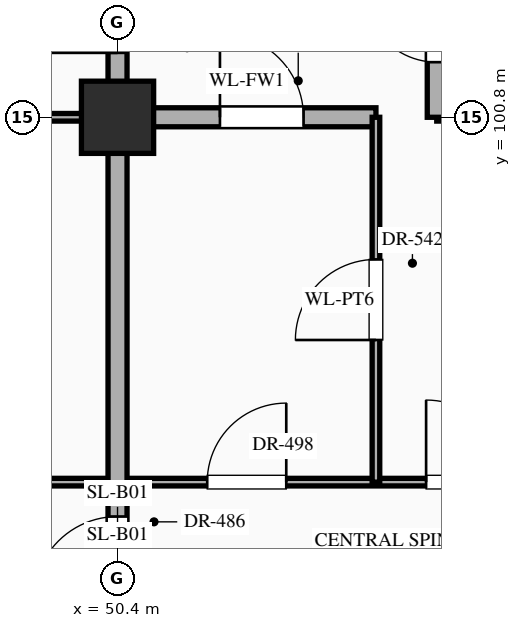
"""IFC4 building model, lengths in metres.
Left out: names, types, materials, properties, quantities, classifications, styles, units other than length and angle.
Written with IfcOpenShell. Run it as: python <this file> out.ifc"""

import sys

from ifc_helpers import new_model, si_unit, direction, frame, frame_2d, origin, origin_2d, place, context, subcontext, project, spatial, rectangle, extrude, element, fill, save


model = new_model("IFC4")
c1 = context("Model", 3, precision=1e-05, world=origin(), true_north=direction((0.0, 1.0)))
c2 = subcontext(c1, "Body", "Model", "MODEL_VIEW")
j1 = project(units=[si_unit("LENGTHUNIT", "METRE"), si_unit("PLANEANGLEUNIT", "RADIAN")], contexts=[c1])
p1 = place(None, origin())
s1 = spatial("IfcSite", under=j1, at=p1, CompositionType="ELEMENT")
p2 = place(p1, origin())
s2 = spatial("IfcBuilding", under=s1, at=p2, CompositionType="ELEMENT")
p3 = place(p2, frame((0.0, 0.0, -5.4)))
s3 = spatial("IfcBuildingStorey", under=s2, at=p3, CompositionType="ELEMENT", Elevation=-5.4)
p4 = place(p3, frame((50.4, 100.8, 0.0), z_axis=(0.0, 0.0, 1.0), x_axis=(1.0, 0.0, 0.0)))
e1 = element("IfcColumn", 1, at=p4, inside=s3, PredefinedType="COLUMN", context=c2, shape_type="SweptSolid", body=[
    extrude(rectangle(XDim=0.95, YDim=0.95, at=origin_2d()), origin(), (0.0, 0.0, 1.0), 5.4),
])
p5 = place(p3, frame((16.8, 96.0, 0.0), z_axis=(0.0, 0.0, 1.0), x_axis=(1.0, 0.0, 0.0)))
e2 = element("IfcWall", 2, at=p5, inside=s3, PredefinedType="STANDARD", context=c2, shape_type="SweptSolid", body=[
    extrude(rectangle(XDim=134.4, YDim=0.1, at=frame_2d((67.2, 0.0))), origin(), (0.0, 0.0, 1.0), 5.1),
])
p6 = place(p5, frame((3.56, 0.0, 0.0)))
e3 = element("IfcOpeningElement", 3, at=p6, cuts=e2, PredefinedType="OPENING", context=c2, shape_type="SweptSolid", body=[
    extrude(rectangle(XDim=1.28, YDim=2.35, at=frame_2d((0.64, 1.175))), frame((0.0, 0.062, 0.0), z_axis=(0.0, -1.0, 0.0), x_axis=(1.0, 0.0, 0.0)), (0.0, 0.0, 1.0), 0.124),
])
p7 = place(p5, frame((9.63, 0.0, 0.0)))
e4 = element("IfcOpeningElement", 4, at=p7, cuts=e2, PredefinedType="OPENING", context=c2, shape_type="SweptSolid", body=[
    extrude(rectangle(XDim=0.94, YDim=2.3, at=frame_2d((0.47, 1.15))), frame((0.0, 0.062, 0.0), z_axis=(0.0, -1.0, 0.0), x_axis=(1.0, 0.0, 0.0)), (0.0, 0.0, 1.0), 0.124),
])
p8 = place(p5, frame((12.51, 0.0, 0.0)))
e5 = element("IfcOpeningElement", 5, at=p8, cuts=e2, PredefinedType="OPENING", context=c2, shape_type="SweptSolid", body=[
    extrude(rectangle(XDim=0.98, YDim=2.35, at=frame_2d((0.49, 1.175))), frame((0.0, 0.062, 0.0), z_axis=(0.0, -1.0, 0.0), x_axis=(1.0, 0.0, 0.0)), (0.0, 0.0, 1.0), 0.124),
])
p9 = place(p5, frame((14.99, 0.0, 0.0)))
e6 = element("IfcOpeningElement", 6, at=p9, cuts=e2, PredefinedType="OPENING", context=c2, shape_type="SweptSolid", body=[
    extrude(rectangle(XDim=1.02, YDim=2.4, at=frame_2d((0.51, 1.2))), frame((0.0, 0.062, 0.0), z_axis=(0.0, -1.0, 0.0), x_axis=(1.0, 0.0, 0.0)), (0.0, 0.0, 1.0), 0.124),
])
p10 = place(p5, frame((20.47, 0.0, 0.0)))
e7 = element("IfcOpeningElement", 7, at=p10, cuts=e2, PredefinedType="OPENING", context=c2, shape_type="SweptSolid", body=[
    extrude(rectangle(XDim=1.06, YDim=2.4, at=frame_2d((0.53, 1.2))), frame((0.0, 0.062, 0.0), z_axis=(0.0, -1.0, 0.0), x_axis=(1.0, 0.0, 0.0)), (0.0, 0.0, 1.0), 0.124),
])
p11 = place(p5, frame((28.83, 0.0, 0.0)))
e8 = element("IfcOpeningElement", 8, at=p11, cuts=e2, PredefinedType="OPENING", context=c2, shape_type="SweptSolid", body=[
    extrude(rectangle(XDim=1.14, YDim=2.4, at=frame_2d((0.57, 1.2))), frame((0.0, 0.062, 0.0), z_axis=(0.0, -1.0, 0.0), x_axis=(1.0, 0.0, 0.0)), (0.0, 0.0, 1.0), 0.124),
])
p12 = place(p5, frame((34.78, 0.0, 0.0)))
e9 = element("IfcOpeningElement", 9, at=p12, cuts=e2, PredefinedType="OPENING", context=c2, shape_type="SweptSolid", body=[
    extrude(rectangle(XDim=1.04, YDim=2.2, at=frame_2d((0.52, 1.1))), frame((0.0, 0.062, 0.0), z_axis=(0.0, -1.0, 0.0), x_axis=(1.0, 0.0, 0.0)), (0.0, 0.0, 1.0), 0.124),
])
p13 = place(p5, frame((37.66, 0.0, 0.0)))
e10 = element("IfcOpeningElement", 10, at=p13, cuts=e2, PredefinedType="OPENING", context=c2, shape_type="SweptSolid", body=[
    extrude(rectangle(XDim=1.08, YDim=2.25, at=frame_2d((0.54, 1.125))), frame((0.0, 0.062, 0.0), z_axis=(0.0, -1.0, 0.0), x_axis=(1.0, 0.0, 0.0)), (0.0, 0.0, 1.0), 0.124),
])
p14 = place(p5, frame((40.14, 0.0, 0.0)))
e11 = element("IfcOpeningElement", 11, at=p14, cuts=e2, PredefinedType="OPENING", context=c2, shape_type="SweptSolid", body=[
    extrude(rectangle(XDim=1.12, YDim=2.25, at=frame_2d((0.56, 1.125))), frame((0.0, 0.062, 0.0), z_axis=(0.0, -1.0, 0.0), x_axis=(1.0, 0.0, 0.0)), (0.0, 0.0, 1.0), 0.124),
])
p15 = place(p5, frame((45.62, 0.0, 0.0)))
e12 = element("IfcOpeningElement", 12, at=p15, cuts=e2, PredefinedType="OPENING", context=c2, shape_type="SweptSolid", body=[
    extrude(rectangle(XDim=1.16, YDim=2.3, at=frame_2d((0.58, 1.15))), frame((0.0, 0.062, 0.0), z_axis=(0.0, -1.0, 0.0), x_axis=(1.0, 0.0, 0.0)), (0.0, 0.0, 1.0), 0.124),
])
p16 = place(p5, frame((54.0, 0.0, 0.0)))
e13 = element("IfcOpeningElement", 13, at=p16, cuts=e2, PredefinedType="OPENING", context=c2, shape_type="SweptSolid", body=[
    extrude(rectangle(XDim=1.2, YDim=2.35, at=frame_2d((0.6, 1.175))), frame((0.0, 0.062, 0.0), z_axis=(0.0, -1.0, 0.0), x_axis=(1.0, 0.0, 0.0)), (0.0, 0.0, 1.0), 0.124),
])
p17 = place(p5, frame((62.38, 0.0, 0.0)))
e14 = element("IfcOpeningElement", 14, at=p17, cuts=e2, PredefinedType="OPENING", context=c2, shape_type="SweptSolid", body=[
    extrude(rectangle(XDim=1.24, YDim=2.3, at=frame_2d((0.62, 1.15))), frame((0.0, 0.062, 0.0), z_axis=(0.0, -1.0, 0.0), x_axis=(1.0, 0.0, 0.0)), (0.0, 0.0, 1.0), 0.124),
])
p18 = place(p5, frame((68.37, 0.0, 0.0)))
e15 = element("IfcOpeningElement", 15, at=p18, cuts=e2, PredefinedType="OPENING", context=c2, shape_type="SweptSolid", body=[
    extrude(rectangle(XDim=1.06, YDim=2.4, at=frame_2d((0.53, 1.2))), frame((0.0, 0.062, 0.0), z_axis=(0.0, -1.0, 0.0), x_axis=(1.0, 0.0, 0.0)), (0.0, 0.0, 1.0), 0.124),
])
p19 = place(p5, frame((71.23, 0.0, 0.0)))
e16 = element("IfcOpeningElement", 16, at=p19, cuts=e2, PredefinedType="OPENING", context=c2, shape_type="SweptSolid", body=[
    extrude(rectangle(XDim=1.14, YDim=2.4, at=frame_2d((0.57, 1.2))), frame((0.0, 0.062, 0.0), z_axis=(0.0, -1.0, 0.0), x_axis=(1.0, 0.0, 0.0)), (0.0, 0.0, 1.0), 0.124),
])
p20 = place(p5, frame((73.85, 0.0, 0.0)))
e17 = element("IfcOpeningElement", 17, at=p20, cuts=e2, PredefinedType="OPENING", context=c2, shape_type="SweptSolid", body=[
    extrude(rectangle(XDim=0.9, YDim=2.15, at=frame_2d((0.45, 1.075))), frame((0.0, 0.062, 0.0), z_axis=(0.0, -1.0, 0.0), x_axis=(1.0, 0.0, 0.0)), (0.0, 0.0, 1.0), 0.124),
])
p21 = place(p5, frame((79.37, 0.0, 0.0)))
e18 = element("IfcOpeningElement", 18, at=p21, cuts=e2, PredefinedType="OPENING", context=c2, shape_type="SweptSolid", body=[
    extrude(rectangle(XDim=0.86, YDim=2.1, at=frame_2d((0.43, 1.05))), frame((0.0, 0.062, 0.0), z_axis=(0.0, -1.0, 0.0), x_axis=(1.0, 0.0, 0.0)), (0.0, 0.0, 1.0), 0.124),
])
p22 = place(p5, frame((87.74, 0.0, 0.0)))
e19 = element("IfcOpeningElement", 19, at=p22, cuts=e2, PredefinedType="OPENING", context=c2, shape_type="SweptSolid", body=[
    extrude(rectangle(XDim=0.92, YDim=2.15, at=frame_2d((0.46, 1.075))), frame((0.0, 0.062, 0.0), z_axis=(0.0, -1.0, 0.0), x_axis=(1.0, 0.0, 0.0)), (0.0, 0.0, 1.0), 0.124),
])
p23 = place(p5, frame((93.62, 0.0, 0.0)))
e20 = element("IfcOpeningElement", 20, at=p23, cuts=e2, PredefinedType="OPENING", context=c2, shape_type="SweptSolid", body=[
    extrude(rectangle(XDim=0.96, YDim=2.2, at=frame_2d((0.48, 1.1))), frame((0.0, 0.062, 0.0), z_axis=(0.0, -1.0, 0.0), x_axis=(1.0, 0.0, 0.0)), (0.0, 0.0, 1.0), 0.124),
])
p24 = place(p5, frame((96.5, 0.0, 0.0)))
e21 = element("IfcOpeningElement", 21, at=p24, cuts=e2, PredefinedType="OPENING", context=c2, shape_type="SweptSolid", body=[
    extrude(rectangle(XDim=1.0, YDim=2.25, at=frame_2d((0.5, 1.125))), frame((0.0, 0.062, 0.0), z_axis=(0.0, -1.0, 0.0), x_axis=(1.0, 0.0, 0.0)), (0.0, 0.0, 1.0), 0.124),
])
p25 = place(p5, frame((98.98, 0.0, 0.0)))
e22 = element("IfcOpeningElement", 22, at=p25, cuts=e2, PredefinedType="OPENING", context=c2, shape_type="SweptSolid", body=[
    extrude(rectangle(XDim=1.04, YDim=2.2, at=frame_2d((0.52, 1.1))), frame((0.0, 0.062, 0.0), z_axis=(0.0, -1.0, 0.0), x_axis=(1.0, 0.0, 0.0)), (0.0, 0.0, 1.0), 0.124),
])
p26 = place(p5, frame((104.53, 0.0, 0.0)))
e23 = element("IfcOpeningElement", 23, at=p26, cuts=e2, PredefinedType="OPENING", context=c2, shape_type="SweptSolid", body=[
    extrude(rectangle(XDim=0.94, YDim=2.3, at=frame_2d((0.47, 1.15))), frame((0.0, 0.062, 0.0), z_axis=(0.0, -1.0, 0.0), x_axis=(1.0, 0.0, 0.0)), (0.0, 0.0, 1.0), 0.124),
])
p27 = place(p5, frame((112.91, 0.0, 0.0)))
e24 = element("IfcOpeningElement", 24, at=p27, cuts=e2, PredefinedType="OPENING", context=c2, shape_type="SweptSolid", body=[
    extrude(rectangle(XDim=0.98, YDim=2.35, at=frame_2d((0.49, 1.175))), frame((0.0, 0.062, 0.0), z_axis=(0.0, -1.0, 0.0), x_axis=(1.0, 0.0, 0.0)), (0.0, 0.0, 1.0), 0.124),
])
p28 = place(p5, frame((118.79, 0.0, 0.0)))
e25 = element("IfcOpeningElement", 25, at=p28, cuts=e2, PredefinedType="OPENING", context=c2, shape_type="SweptSolid", body=[
    extrude(rectangle(XDim=1.02, YDim=2.4, at=frame_2d((0.51, 1.2))), frame((0.0, 0.062, 0.0), z_axis=(0.0, -1.0, 0.0), x_axis=(1.0, 0.0, 0.0)), (0.0, 0.0, 1.0), 0.124),
])
p29 = place(p5, frame((121.67, 0.0, 0.0)))
e26 = element("IfcOpeningElement", 26, at=p29, cuts=e2, PredefinedType="OPENING", context=c2, shape_type="SweptSolid", body=[
    extrude(rectangle(XDim=1.06, YDim=2.4, at=frame_2d((0.53, 1.2))), frame((0.0, 0.062, 0.0), z_axis=(0.0, -1.0, 0.0), x_axis=(1.0, 0.0, 0.0)), (0.0, 0.0, 1.0), 0.124),
])
p30 = place(p5, frame((124.13, 0.0, 0.0)))
e27 = element("IfcOpeningElement", 27, at=p30, cuts=e2, PredefinedType="OPENING", context=c2, shape_type="SweptSolid", body=[
    extrude(rectangle(XDim=1.14, YDim=2.4, at=frame_2d((0.57, 1.2))), frame((0.0, 0.062, 0.0), z_axis=(0.0, -1.0, 0.0), x_axis=(1.0, 0.0, 0.0)), (0.0, 0.0, 1.0), 0.124),
])
p31 = place(p5, frame((129.75, 0.0, 0.0)))
e28 = element("IfcOpeningElement", 28, at=p31, cuts=e2, PredefinedType="OPENING", context=c2, shape_type="SweptSolid", body=[
    extrude(rectangle(XDim=0.9, YDim=2.15, at=frame_2d((0.45, 1.075))), frame((0.0, 0.062, 0.0), z_axis=(0.0, -1.0, 0.0), x_axis=(1.0, 0.0, 0.0)), (0.0, 0.0, 1.0), 0.124),
])
p32 = place(p3, frame((46.2, 100.8, 0.0), z_axis=(0.0, 0.0, 1.0), x_axis=(1.0, 0.0, 0.0)))
e29 = element("IfcWall", 29, at=p32, inside=s3, PredefinedType="STANDARD", context=c2, shape_type="SweptSolid", body=[
    extrude(rectangle(XDim=4.2, YDim=0.1, at=frame_2d((2.1, 0.0))), origin(), (0.0, 0.0, 1.0), 4.25),
])
p33 = place(p32, frame((1.403, 0.0, 0.0)))
e30 = element("IfcOpeningElement", 30, at=p33, cuts=e29, PredefinedType="OPENING", context=c2, shape_type="SweptSolid", body=[
    extrude(rectangle(XDim=1.0, YDim=2.25, at=frame_2d((0.5, 1.125))), frame((0.0, 0.062, 0.0), z_axis=(0.0, -1.0, 0.0), x_axis=(1.0, 0.0, 0.0)), (0.0, 0.0, 1.0), 0.124),
])
p34 = place(p3, frame((50.4, 100.8, 0.0), z_axis=(0.0, 0.0, 1.0), x_axis=(1.0, 0.0, 0.0)))
e31 = element("IfcWall", 31, at=p34, inside=s3, PredefinedType="STANDARD", context=c2, shape_type="SweptSolid", body=[
    extrude(rectangle(XDim=3.4, YDim=0.25, at=frame_2d((1.7, 0.0))), origin(), (0.0, 0.0, 1.0), 4.25),
])
p35 = place(p34, frame((1.347, 0.0, 0.0)))
e32 = element("IfcOpeningElement", 32, at=p35, cuts=e31, PredefinedType="OPENING", context=c2, shape_type="SweptSolid", body=[
    extrude(rectangle(XDim=1.1, YDim=2.2, at=frame_2d((0.55, 1.1))), frame((0.0, 0.137, 0.0), z_axis=(0.0, -1.0, 0.0), x_axis=(1.0, 0.0, 0.0)), (0.0, 0.0, 1.0), 0.274),
])
p36 = place(p3, frame((54.6, 100.8, 0.0), z_axis=(0.0, 0.0, 1.0), x_axis=(1.0, 0.0, 0.0)))
e33 = element("IfcWall", 33, at=p36, inside=s3, PredefinedType="STANDARD", context=c2, shape_type="SweptSolid", body=[
    extrude(rectangle(XDim=4.2, YDim=0.1, at=frame_2d((2.1, 0.0))), origin(), (0.0, 0.0, 1.0), 4.25),
])
p37 = place(p36, frame((0.2, 0.0, 0.0)))
e34 = element("IfcOpeningElement", 34, at=p37, cuts=e33, PredefinedType="OPENING", context=c2, shape_type="SweptSolid", body=[
    extrude(rectangle(XDim=1.2, YDim=2.35, at=frame_2d((0.6, 1.175))), frame((0.0, 0.062, 0.0), z_axis=(0.0, -1.0, 0.0), x_axis=(1.0, 0.0, 0.0)), (0.0, 0.0, 1.0), 0.124),
])
p38 = place(p36, frame((2.083, 0.0, 0.0)))
e35 = element("IfcOpeningElement", 35, at=p38, cuts=e33, PredefinedType="OPENING", context=c2, shape_type="SweptSolid", body=[
    extrude(rectangle(XDim=1.24, YDim=2.3, at=frame_2d((0.62, 1.15))), frame((0.0, 0.062, 0.0), z_axis=(0.0, -1.0, 0.0), x_axis=(1.0, 0.0, 0.0)), (0.0, 0.0, 1.0), 0.124),
])
p39 = place(p3, frame((50.4, 91.2, 0.0), z_axis=(0.0, 0.0, 1.0), x_axis=(0.0, 1.0, 0.0)))
e36 = element("IfcWall", 36, at=p39, inside=s3, PredefinedType="STANDARD", context=c2, shape_type="SweptSolid", body=[
    extrude(rectangle(XDim=13.2, YDim=0.25, at=frame_2d((6.6, 0.0))), origin(), (0.0, 0.0, 1.0), 4.35),
])
p40 = place(p39, frame((0.528, 0.0, 0.0)))
e37 = element("IfcOpeningElement", 37, at=p40, cuts=e36, PredefinedType="OPENING", context=c2, shape_type="SweptSolid", body=[
    extrude(rectangle(XDim=0.95, YDim=2.15, at=frame_2d((0.475, 1.075))), frame((0.0, 0.137, 0.0), z_axis=(0.0, -1.0, 0.0), x_axis=(1.0, 0.0, 0.0)), (0.0, 0.0, 1.0), 0.274),
])
p41 = place(p39, frame((10.448, 0.0, 0.0)))
e38 = element("IfcOpeningElement", 38, at=p41, cuts=e36, PredefinedType="OPENING", context=c2, shape_type="SweptSolid", body=[
    extrude(rectangle(XDim=1.1, YDim=2.2, at=frame_2d((0.55, 1.1))), frame((0.0, 0.137, 0.0), z_axis=(0.0, -1.0, 0.0), x_axis=(1.0, 0.0, 0.0)), (0.0, 0.0, 1.0), 0.274),
])
p42 = place(p39, frame((3.248, 0.0, 0.0)))
e39 = element("IfcOpeningElement", 39, at=p42, cuts=e36, PredefinedType="OPENING", context=c2, shape_type="SweptSolid", body=[
    extrude(rectangle(XDim=1.1, YDim=2.2, at=frame_2d((0.55, 1.1))), frame((0.0, 0.137, 0.0), z_axis=(0.0, -1.0, 0.0), x_axis=(1.0, 0.0, 0.0)), (0.0, 0.0, 1.0), 0.274),
])
p43 = place(p3, frame((53.8, 96.0, 0.0), z_axis=(0.0, 0.0, 1.0), x_axis=(0.0, 1.0, 0.0)))
e40 = element("IfcWall", 40, at=p43, inside=s3, PredefinedType="STANDARD", context=c2, shape_type="SweptSolid", body=[
    extrude(rectangle(XDim=4.8, YDim=0.1, at=frame_2d((2.4, 0.0))), origin(), (0.0, 0.0, 1.0), 5.1),
])
p44 = place(p43, frame((1.87, 0.0, 0.0)))
e41 = element("IfcOpeningElement", 41, at=p44, cuts=e40, PredefinedType="OPENING", context=c2, shape_type="SweptSolid", body=[
    extrude(rectangle(XDim=1.06, YDim=2.4, at=frame_2d((0.53, 1.2))), frame((0.0, 0.062, 0.0), z_axis=(0.0, -1.0, 0.0), x_axis=(1.0, 0.0, 0.0)), (0.0, 0.0, 1.0), 0.124),
])
p45 = place(p3, frame((54.6, 100.8, 0.0), z_axis=(0.0, 0.0, 1.0), x_axis=(0.0, 1.0, 0.0)))
e42 = element("IfcWall", 42, at=p45, inside=s3, PredefinedType="STANDARD", context=c2, shape_type="SweptSolid", body=[
    extrude(rectangle(XDim=3.6, YDim=0.25, at=frame_2d((1.8, 0.0))), origin(), (0.0, 0.0, 1.0), 4.55),
])
p46 = place(p45, frame((0.725, 0.0, 0.0)))
e43 = element("IfcOpeningElement", 43, at=p46, cuts=e42, PredefinedType="OPENING", context=c2, shape_type="SweptSolid", body=[
    extrude(rectangle(XDim=0.95, YDim=2.15, at=frame_2d((0.475, 1.075))), frame((0.0, 0.137, 0.0), z_axis=(0.0, -1.0, 0.0), x_axis=(1.0, 0.0, 0.0)), (0.0, 0.0, 1.0), 0.274),
])
p47 = place(p41, origin())
e44 = element("IfcDoor", 44, at=p47, inside=s3, OperationType="SINGLE_SWING_LEFT", PredefinedType="DOOR", context=c2, shape_type="SweptSolid", body=[
    extrude(rectangle(XDim=1.1, YDim=2.2, at=frame_2d((0.55, 1.1))), frame((0.0, 0.025, 0.0), z_axis=(0.0, -1.0, 0.0), x_axis=(1.0, 0.0, 0.0)), (0.0, 0.0, 1.0), 0.05),
])
fill(e38, e44)
p48 = place(p46, origin())
e45 = element("IfcDoor", 45, at=p48, inside=s3, OperationType="SINGLE_SWING_RIGHT", PredefinedType="DOOR", context=c2, shape_type="SweptSolid", body=[
    extrude(rectangle(XDim=0.95, YDim=2.15, at=frame_2d((0.475, 1.075))), frame((0.0, 0.025, 0.0), z_axis=(0.0, -1.0, 0.0), x_axis=(1.0, 0.0, 0.0)), (0.0, 0.0, 1.0), 0.05),
])
fill(e43, e45)
p49 = place(p35, origin())
e46 = element("IfcDoor", 46, at=p49, inside=s3, OperationType="SINGLE_SWING_LEFT", PredefinedType="DOOR", context=c2, shape_type="SweptSolid", body=[
    extrude(rectangle(XDim=1.1, YDim=2.2, at=frame_2d((0.55, 1.1))), frame((0.0, 0.025, 0.0), z_axis=(0.0, -1.0, 0.0), x_axis=(1.0, 0.0, 0.0)), (0.0, 0.0, 1.0), 0.05),
])
fill(e32, e46)
p50 = place(p42, origin())
e47 = element("IfcDoor", 47, at=p50, inside=s3, OperationType="SINGLE_SWING_LEFT", PredefinedType="DOOR", context=c2, shape_type="SweptSolid", body=[
    extrude(rectangle(XDim=1.1, YDim=2.2, at=frame_2d((0.55, 1.1))), frame((0.0, 0.025, 0.0), z_axis=(0.0, -1.0, 0.0), x_axis=(1.0, 0.0, 0.0)), (0.0, 0.0, 1.0), 0.05),
])
fill(e39, e47)
p51 = place(p12, origin())
e48 = element("IfcDoor", 48, at=p51, inside=s3, OperationType="SINGLE_SWING_RIGHT", PredefinedType="DOOR", context=c2, shape_type="SweptSolid", body=[
    extrude(rectangle(XDim=1.04, YDim=2.2, at=frame_2d((0.52, 1.1))), frame((0.0, 0.025, 0.0), z_axis=(0.0, -1.0, 0.0), x_axis=(1.0, 0.0, 0.0)), (0.0, 0.0, 1.0), 0.05),
])
fill(e9, e48)
p52 = place(p13, origin())
e49 = element("IfcDoor", 49, at=p52, inside=s3, OperationType="SINGLE_SWING_LEFT", PredefinedType="DOOR", context=c2, shape_type="SweptSolid", body=[
    extrude(rectangle(XDim=1.08, YDim=2.25, at=frame_2d((0.54, 1.125))), frame((0.0, 0.025, 0.0), z_axis=(0.0, -1.0, 0.0), x_axis=(1.0, 0.0, 0.0)), (0.0, 0.0, 1.0), 0.05),
])
fill(e10, e49)
p53 = place(p44, origin())
e50 = element("IfcDoor", 50, at=p53, inside=s3, OperationType="SINGLE_SWING_LEFT", PredefinedType="DOOR", context=c2, shape_type="SweptSolid", body=[
    extrude(rectangle(XDim=1.06, YDim=2.4, at=frame_2d((0.53, 1.2))), frame((0.0, 0.025, 0.0), z_axis=(0.0, -1.0, 0.0), x_axis=(1.0, 0.0, 0.0)), (0.0, 0.0, 1.0), 0.05),
])
fill(e41, e50)
save(model, sys.argv[1])
